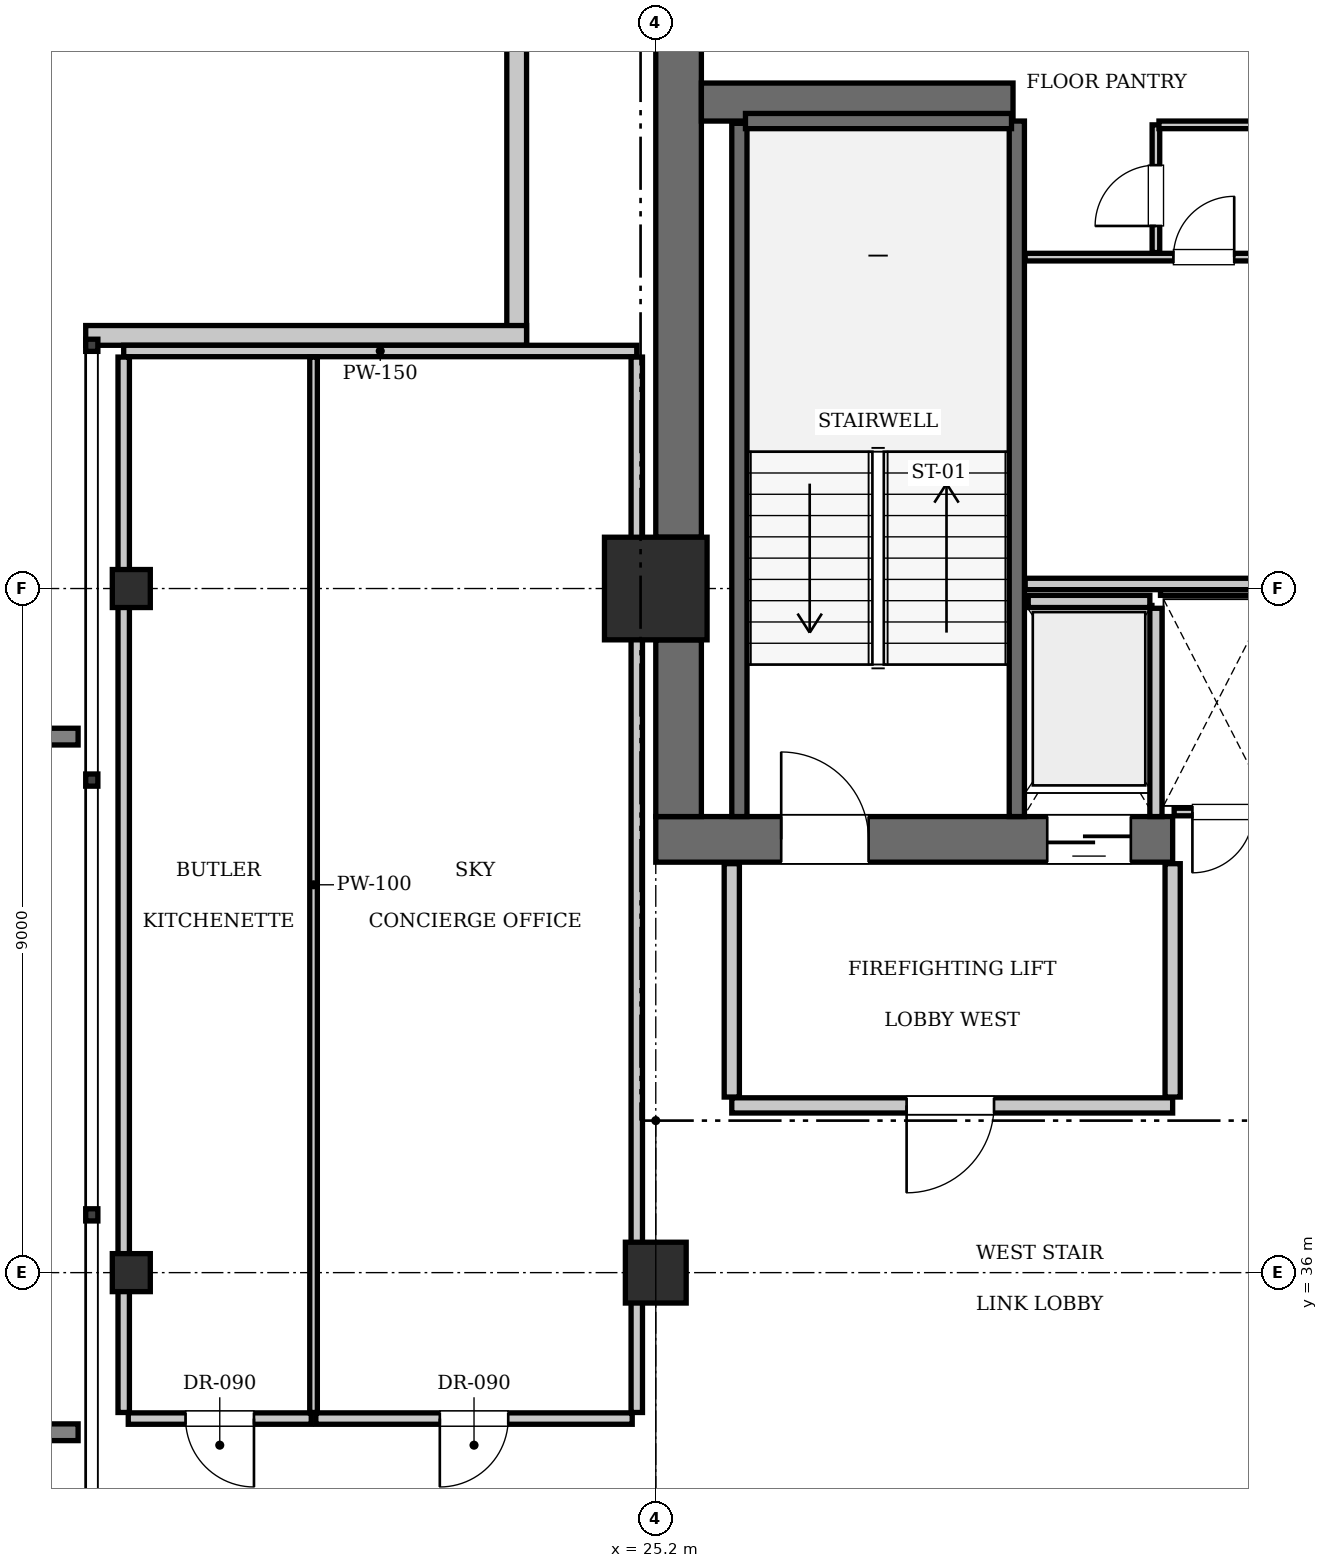
"""IFC4 building model, lengths in metres.
Left out: names, types, materials, properties, quantities, classifications, styles, units other than length and angle.
Written with IfcOpenShell. Run it as: python <this file> out.ifc"""

import sys

from ifc_helpers import new_model, si_unit, direction, frame, frame_2d, origin, origin_2d, place, context, subcontext, project, spatial, rectangle, i_section, extrude, element, fill, save


model = new_model("IFC4")
c1 = context("Model", 3, precision=1e-05, world=origin(), true_north=direction((0.0, 1.0)))
c2 = subcontext(c1, "Body", "Model", "MODEL_VIEW")
j1 = project(units=[si_unit("LENGTHUNIT", "METRE"), si_unit("PLANEANGLEUNIT", "RADIAN")], contexts=[c1])
p1 = place(None, origin())
s1 = spatial("IfcSite", under=j1, at=p1, CompositionType="ELEMENT")
p2 = place(p1, origin())
s2 = spatial("IfcBuilding", under=s1, at=p2, CompositionType="ELEMENT")
p3 = place(p2, frame((0.0, 0.0, 329.7)))
s3 = spatial("IfcBuildingStorey", under=s2, at=p3, CompositionType="ELEMENT", Elevation=329.7)
p4 = place(p3, frame((25.2, 45.0, 0.0), z_axis=(0.0, 0.0, 1.0), x_axis=(1.0, 0.0, 0.0)))
e1 = element("IfcColumn", 1, at=p4, inside=s3, PredefinedType="COLUMN", context=c2, shape_type="SweptSolid", body=[
    extrude(rectangle(XDim=1.35, YDim=1.35, at=origin_2d()), origin(), (0.0, 0.0, 1.0), 3.85),
])
p5 = place(p3, frame((25.2, 41.7, 0.0), z_axis=(0.0, 0.0, 1.0), x_axis=(1.0, 0.0, 0.0)))
e2 = element("IfcWall", 2, at=p5, inside=s3, PredefinedType="SHEAR", context=c2, shape_type="SweptSolid", body=[
    extrude(rectangle(XDim=6.8, YDim=0.6, at=frame_2d((3.4, 0.0))), origin(), (0.0, 0.0, 1.0), 3.85),
])
p6 = place(p5, frame((1.65, 0.0, 0.0)))
e3 = element("IfcOpeningElement", 3, at=p6, cuts=e2, PredefinedType="OPENING", context=c2, shape_type="SweptSolid", body=[
    extrude(rectangle(XDim=1.15, YDim=2.15, at=frame_2d((0.575, 1.075))), frame((0.0, 0.31, 0.0), z_axis=(0.0, -1.0, 0.0), x_axis=(1.0, 0.0, 0.0)), (0.0, 0.0, 1.0), 0.62),
])
p7 = place(p5, frame((5.15, 0.0, 0.0)))
e4 = element("IfcOpeningElement", 4, at=p7, cuts=e2, PredefinedType="OPENING", context=c2, shape_type="SweptSolid", body=[
    extrude(rectangle(XDim=1.1, YDim=2.2, at=frame_2d((0.55, 1.1))), frame((0.0, 0.31, 0.0), z_axis=(0.0, -1.0, 0.0), x_axis=(1.0, 0.0, 0.0)), (0.0, 0.0, 1.0), 0.62),
])
p8 = place(p3, frame((25.5, 42.0, 0.0), z_axis=(0.0, 0.0, 1.0), x_axis=(0.0, 1.0, 0.0)))
e5 = element("IfcWall", 5, at=p8, inside=s3, PredefinedType="SHEAR", context=c2, shape_type="SweptSolid", body=[
    extrude(rectangle(XDim=2.325, YDim=0.6, at=frame_2d((1.163, 0.0))), origin(), (0.0, 0.0, 1.0), 3.85),
])
p9 = place(p3, frame((25.5, 45.675, 0.0), z_axis=(0.0, 0.0, 1.0), x_axis=(0.0, 1.0, 0.0)))
e6 = element("IfcWall", 6, at=p9, inside=s3, PredefinedType="SHEAR", context=c2, shape_type="SweptSolid", body=[
    extrude(rectangle(XDim=7.725, YDim=0.6, at=frame_2d((3.862, 0.0))), origin(), (0.0, 0.0, 1.0), 3.85),
])
p10 = place(p3, frame((25.8, 51.4, 0.0), z_axis=(0.0, 0.0, 1.0), x_axis=(1.0, 0.0, 0.0)))
e7 = element("IfcWall", 7, at=p10, inside=s3, PredefinedType="SHEAR", context=c2, shape_type="SweptSolid", body=[
    extrude(rectangle(XDim=4.1, YDim=0.5, at=frame_2d((2.05, 0.0))), origin(), (0.0, 0.0, 1.0), 3.85),
])
p11 = place(p3, frame((25.2, 36.0, 0.0), z_axis=(0.0, 0.0, 1.0), x_axis=(1.0, 0.0, 0.0)))
e8 = element("IfcColumn", 8, at=p11, inside=s3, PredefinedType="COLUMN", context=c2, shape_type="SweptSolid", body=[
    extrude(rectangle(XDim=0.8, YDim=0.8, at=origin_2d()), origin(), (0.0, 0.0, 1.0), 3.85),
])
for number, where, z_axis, x_axis in (
    (9, (18.3, 36.0, 0.0), (0.0, 0.0, 1.0), (1.0, 0.0, 0.0)),
    (10, (18.3, 45.0, 0.0), (0.0, 0.0, 1.0), (1.0, 0.0, 0.0)),
):
    element("IfcColumn", number, at=place(p3, frame(where, z_axis=z_axis, x_axis=x_axis)), inside=s3, PredefinedType="COLUMN", context=c2, shape_type="SweptSolid", body=[
        extrude(i_section(OverallWidth=0.5, OverallDepth=0.5, WebThickness=0.022, FlangeThickness=0.032, at=origin_2d()), origin(), (0.0, 0.0, 1.0), 3.85),
    ])
p12 = place(p3, frame((29.95, 42.0, 0.0), z_axis=(0.0, 0.0, 1.0), x_axis=(0.0, 1.0, 0.0)))
e11 = element("IfcWall", 11, at=p12, inside=s3, PredefinedType="SOLIDWALL", context=c2, shape_type="SweptSolid", body=[
    extrude(rectangle(XDim=9.15, YDim=0.2, at=frame_2d((4.575, 0.0))), origin(), (0.0, 0.0, 1.0), 3.61),
])
p13 = place(p3, frame((26.3, 42.0, 0.0), z_axis=(0.0, 0.0, 1.0), x_axis=(0.0, 1.0, 0.0)))
e12 = element("IfcWall", 12, at=p13, inside=s3, PredefinedType="SOLIDWALL", context=c2, shape_type="SweptSolid", body=[
    extrude(rectangle(XDim=9.12, YDim=0.2, at=frame_2d((4.56, 0.0))), origin(), (0.0, 0.0, 1.0), 3.61),
])
p14 = place(p3, frame((26.38, 51.15, 0.0), z_axis=(0.0, 0.0, 1.0), x_axis=(1.0, 0.0, 0.0)))
e13 = element("IfcWall", 13, at=p14, inside=s3, PredefinedType="SOLIDWALL", context=c2, shape_type="SweptSolid", body=[
    extrude(rectangle(XDim=3.5, YDim=0.2, at=frame_2d((1.75, 0.0))), origin(), (0.0, 0.0, 1.0), 3.61),
])
p15 = place(p3, frame((30.1, 44.83, 0.0), z_axis=(0.0, 0.0, 1.0), x_axis=(1.0, 0.0, 0.0)))
e14 = element("IfcWall", 14, at=p15, inside=s3, PredefinedType="SOLIDWALL", context=c2, shape_type="SweptSolid", body=[
    extrude(rectangle(XDim=1.6, YDim=0.16, at=frame_2d((0.8, 0.0))), origin(), (0.0, 0.0, 1.0), 3.61),
])
p16 = place(p3, frame((31.78, 42.0, 0.0), z_axis=(0.0, 0.0, 1.0), x_axis=(0.0, 1.0, 0.0)))
e15 = element("IfcWall", 15, at=p16, inside=s3, PredefinedType="SOLIDWALL", context=c2, shape_type="SweptSolid", body=[
    extrude(rectangle(XDim=2.74, YDim=0.16, at=frame_2d((1.37, 0.0))), origin(), (0.0, 0.0, 1.0), 3.61),
])
for number, where, z_axis, x_axis in (
    (16, (23.37, 48.2, 0.0), (0.0, 0.0, 1.0), (0.0, 1.0, 0.0)),
    (17, (17.7, 48.33, 0.0), (0.0, 0.0, 1.0), (1.0, 0.0, 0.0)),
):
    element("IfcWall", number, at=place(p3, frame(where, z_axis=z_axis, x_axis=x_axis)), inside=s3, PredefinedType="SOLIDWALL", context=c2, shape_type="SweptSolid", body=[
        extrude(rectangle(XDim=5.8, YDim=0.26, at=frame_2d((2.9, 0.0))), origin(), (0.0, 0.0, 1.0), 3.61),
    ])
p17 = place(p3, frame((26.2, 38.2, 0.0), z_axis=(0.0, 0.0, 1.0), x_axis=(1.0, 0.0, 0.0)))
e18 = element("IfcWall", 18, at=p17, inside=s3, PredefinedType="PARTITIONING", context=c2, shape_type="SweptSolid", body=[
    extrude(rectangle(XDim=5.8, YDim=0.2, at=frame_2d((2.9, 0.0))), origin(), (0.0, 0.0, 1.0), 3.61),
])
p18 = place(p17, frame((2.3, 0.0, 0.0)))
e19 = element("IfcOpeningElement", 19, at=p18, cuts=e18, PredefinedType="OPENING", context=c2, shape_type="SweptSolid", body=[
    extrude(rectangle(XDim=1.15, YDim=2.15, at=frame_2d((0.575, 1.075))), frame((0.0, 0.11, 0.0), z_axis=(0.0, -1.0, 0.0), x_axis=(1.0, 0.0, 0.0)), (0.0, 0.0, 1.0), 0.22),
])
for number, where, z_axis, x_axis in (
    (20, (26.2, 38.31, 0.0), (0.0, 0.0, 1.0), (0.0, 1.0, 0.0)),
    (21, (32.0, 38.31, 0.0), (0.0, 0.0, 1.0), (0.0, 1.0, 0.0)),
):
    element("IfcWall", number, at=place(p3, frame(where, z_axis=z_axis, x_axis=x_axis)), inside=s3, PredefinedType="PARTITIONING", context=c2, shape_type="SweptSolid", body=[
        extrude(rectangle(XDim=3.07, YDim=0.2, at=frame_2d((1.535, 0.0))), origin(), (0.0, 0.0, 1.0), 3.61),
    ])
p19 = place(p3, frame((32.02, 42.06, 0.0), z_axis=(0.0, 0.0, 1.0), x_axis=(1.0, 0.0, 0.0)))
e22 = element("IfcWall", 22, at=p19, inside=s3, PredefinedType="PARTITIONING", context=c2, shape_type="SweptSolid", body=[
    extrude(rectangle(XDim=1.32, YDim=0.1, at=frame_2d((0.66, 0.0))), origin(), (0.0, 0.0, 1.0), 3.61),
])
p20 = place(p19, frame((0.24, 0.0, 0.0)))
e23 = element("IfcOpeningElement", 23, at=p20, cuts=e22, PredefinedType="OPENING", context=c2, shape_type="SweptSolid", body=[
    extrude(rectangle(XDim=0.8, YDim=2.05, at=frame_2d((0.4, 1.025))), frame((0.0, 0.06, 0.0), z_axis=(0.0, -1.0, 0.0), x_axis=(1.0, 0.0, 0.0)), (0.0, 0.0, 1.0), 0.12),
])
p21 = place(p3, frame((31.84, 44.96, 0.0), z_axis=(0.0, 0.0, 1.0), x_axis=(1.0, 0.0, 0.0)))
e24 = element("IfcWall", 24, at=p21, inside=s3, PredefinedType="PARTITIONING", context=c2, shape_type="SweptSolid", body=[
    extrude(rectangle(XDim=1.48, YDim=0.1, at=frame_2d((0.74, 0.0))), origin(), (0.0, 0.0, 1.0), 3.61),
])
p22 = place(p3, frame((30.06, 45.06, 0.0), z_axis=(0.0, 0.0, 1.0), x_axis=(1.0, 0.0, 0.0)))
e25 = element("IfcWall", 25, at=p22, inside=s3, PredefinedType="PARTITIONING", context=c2, shape_type="SweptSolid", body=[
    extrude(rectangle(XDim=3.18, YDim=0.15, at=frame_2d((1.59, 0.0))), origin(), (0.0, 0.0, 1.0), 3.61),
])
p23 = place(p3, frame((30.06, 49.36, 0.0), z_axis=(0.0, 0.0, 1.0), x_axis=(1.0, 0.0, 0.0)))
e26 = element("IfcWall", 26, at=p23, inside=s3, PredefinedType="PARTITIONING", context=c2, shape_type="SweptSolid", body=[
    extrude(rectangle(XDim=3.18, YDim=0.1, at=frame_2d((1.59, 0.0))), origin(), (0.0, 0.0, 1.0), 3.61),
])
p24 = place(p23, frame((1.95, 0.0, 0.0)))
e27 = element("IfcOpeningElement", 27, at=p24, cuts=e26, PredefinedType="OPENING", context=c2, shape_type="SweptSolid", body=[
    extrude(rectangle(XDim=0.8, YDim=2.05, at=frame_2d((0.4, 1.025))), frame((0.0, 0.06, 0.0), z_axis=(0.0, -1.0, 0.0), x_axis=(1.0, 0.0, 0.0)), (0.0, 0.0, 1.0), 0.12),
])
p25 = place(p3, frame((31.78, 49.42, 0.0), z_axis=(0.0, 0.0, 1.0), x_axis=(0.0, 1.0, 0.0)))
e28 = element("IfcWall", 28, at=p25, inside=s3, PredefinedType="PARTITIONING", context=c2, shape_type="SweptSolid", body=[
    extrude(rectangle(XDim=1.68, YDim=0.1, at=frame_2d((0.84, 0.0))), origin(), (0.0, 0.0, 1.0), 3.61),
])
p26 = place(p25, frame((0.35, 0.0, 0.0)))
e29 = element("IfcOpeningElement", 29, at=p26, cuts=e28, PredefinedType="OPENING", context=c2, shape_type="SweptSolid", body=[
    extrude(rectangle(XDim=0.8, YDim=2.05, at=frame_2d((0.4, 1.025))), frame((0.0, 0.06, 0.0), z_axis=(0.0, -1.0, 0.0), x_axis=(1.0, 0.0, 0.0)), (0.0, 0.0, 1.0), 0.12),
])
p27 = place(p3, frame((31.82, 51.1, 0.0), z_axis=(0.0, 0.0, 1.0), x_axis=(1.0, 0.0, 0.0)))
e30 = element("IfcWall", 30, at=p27, inside=s3, PredefinedType="PARTITIONING", context=c2, shape_type="SweptSolid", body=[
    extrude(rectangle(XDim=1.42, YDim=0.1, at=frame_2d((0.71, 0.0))), origin(), (0.0, 0.0, 1.0), 3.61),
])
p28 = place(p3, frame((18.2, 48.125, 0.0), z_axis=(0.0, 0.0, 1.0), x_axis=(1.0, 0.0, 0.0)))
e31 = element("IfcWall", 31, at=p28, inside=s3, PredefinedType="PARTITIONING", context=c2, shape_type="SweptSolid", body=[
    extrude(rectangle(XDim=6.75, YDim=0.15, at=frame_2d((3.375, 0.0))), origin(), (0.0, 0.0, 1.0), 3.61),
])
p29 = place(p3, frame((18.2, 34.16, 0.0), z_axis=(0.0, 0.0, 1.0), x_axis=(0.0, 1.0, 0.0)))
e32 = element("IfcWall", 32, at=p29, inside=s3, PredefinedType="PARTITIONING", context=c2, shape_type="SweptSolid", body=[
    extrude(rectangle(XDim=13.885, YDim=0.15, at=frame_2d((6.942, 0.0))), origin(), (0.0, 0.0, 1.0), 3.141),
])
p30 = place(p3, frame((24.95, 34.16, 0.0), z_axis=(0.0, 0.0, 1.0), x_axis=(0.0, 1.0, 0.0)))
e33 = element("IfcWall", 33, at=p30, inside=s3, PredefinedType="PARTITIONING", context=c2, shape_type="SweptSolid", body=[
    extrude(rectangle(XDim=13.885, YDim=0.15, at=frame_2d((6.942, 0.0))), origin(), (0.0, 0.0, 1.0), 3.61),
])
p31 = place(p3, frame((18.26, 34.08, 0.0), z_axis=(0.0, 0.0, 1.0), x_axis=(1.0, 0.0, 0.0)))
e34 = element("IfcWall", 34, at=p31, inside=s3, PredefinedType="PARTITIONING", context=c2, shape_type="SweptSolid", body=[
    extrude(rectangle(XDim=2.407, YDim=0.15, at=frame_2d((1.204, 0.0))), origin(), (0.0, 0.0, 1.0), 3.61),
])
p32 = place(p31, frame((0.754, 0.0, 0.0)))
e35 = element("IfcOpeningElement", 35, at=p32, cuts=e34, PredefinedType="OPENING", context=c2, shape_type="SweptSolid", body=[
    extrude(rectangle(XDim=0.9, YDim=2.1, at=frame_2d((0.45, 1.05))), frame((0.0, 0.085, 0.0), z_axis=(0.0, -1.0, 0.0), x_axis=(1.0, 0.0, 0.0)), (0.0, 0.0, 1.0), 0.17),
])
p33 = place(p3, frame((20.698, 34.16, 0.0), z_axis=(0.0, 0.0, 1.0), x_axis=(0.0, 1.0, 0.0)))
e36 = element("IfcWall", 36, at=p33, inside=s3, PredefinedType="PARTITIONING", context=c2, shape_type="SweptSolid", body=[
    extrude(rectangle(XDim=13.885, YDim=0.1, at=frame_2d((6.942, 0.0))), origin(), (0.0, 0.0, 1.0), 3.61),
])
p34 = place(p3, frame((20.728, 34.08, 0.0), z_axis=(0.0, 0.0, 1.0), x_axis=(1.0, 0.0, 0.0)))
e37 = element("IfcWall", 37, at=p34, inside=s3, PredefinedType="PARTITIONING", context=c2, shape_type="SweptSolid", body=[
    extrude(rectangle(XDim=4.162, YDim=0.15, at=frame_2d((2.081, 0.0))), origin(), (0.0, 0.0, 1.0), 3.61),
])
p35 = place(p34, frame((1.631, 0.0, 0.0)))
e38 = element("IfcOpeningElement", 38, at=p35, cuts=e37, PredefinedType="OPENING", context=c2, shape_type="SweptSolid", body=[
    extrude(rectangle(XDim=0.9, YDim=2.1, at=frame_2d((0.45, 1.05))), frame((0.0, 0.085, 0.0), z_axis=(0.0, -1.0, 0.0), x_axis=(1.0, 0.0, 0.0)), (0.0, 0.0, 1.0), 0.17),
])
p36 = place(p6, origin())
e39 = element("IfcDoor", 39, at=p36, inside=s3, OperationType="SINGLE_SWING_LEFT", PredefinedType="DOOR", context=c2, shape_type="SweptSolid", body=[
    extrude(rectangle(XDim=1.15, YDim=2.15, at=frame_2d((0.575, 1.075))), frame((0.0, 0.025, 0.0), z_axis=(0.0, -1.0, 0.0), x_axis=(1.0, 0.0, 0.0)), (0.0, 0.0, 1.0), 0.05),
])
fill(e3, e39)
p37 = place(p7, frame((1.1, 0.0, 0.0), z_axis=(0.0, 0.0, 1.0), x_axis=(-1.0, 0.0, 0.0)))
e40 = element("IfcDoor", 40, at=p37, inside=s3, OperationType="SLIDING_TO_LEFT", PredefinedType="DOOR", context=c2, shape_type="SweptSolid", body=[
    extrude(rectangle(XDim=1.1, YDim=2.2, at=frame_2d((0.55, 1.1))), frame((0.0, 0.025, 0.0), z_axis=(0.0, -1.0, 0.0), x_axis=(1.0, 0.0, 0.0)), (0.0, 0.0, 1.0), 0.05),
])
fill(e4, e40)
p38 = place(p18, frame((1.15, 0.0, 0.0), z_axis=(0.0, 0.0, 1.0), x_axis=(-1.0, 0.0, 0.0)))
e41 = element("IfcDoor", 41, at=p38, inside=s3, OperationType="SINGLE_SWING_RIGHT", PredefinedType="DOOR", context=c2, shape_type="SweptSolid", body=[
    extrude(rectangle(XDim=1.15, YDim=2.15, at=frame_2d((0.575, 1.075))), frame((0.0, 0.025, 0.0), z_axis=(0.0, -1.0, 0.0), x_axis=(1.0, 0.0, 0.0)), (0.0, 0.0, 1.0), 0.05),
])
fill(e19, e41)
p39 = place(p20, frame((0.8, 0.0, 0.0), z_axis=(0.0, 0.0, 1.0), x_axis=(-1.0, 0.0, 0.0)))
e42 = element("IfcDoor", 42, at=p39, inside=s3, OperationType="SINGLE_SWING_RIGHT", PredefinedType="DOOR", context=c2, shape_type="SweptSolid", body=[
    extrude(rectangle(XDim=0.8, YDim=2.05, at=frame_2d((0.4, 1.025))), frame((0.0, 0.025, 0.0), z_axis=(0.0, -1.0, 0.0), x_axis=(1.0, 0.0, 0.0)), (0.0, 0.0, 1.0), 0.05),
])
fill(e23, e42)
p40 = place(p24, origin())
e43 = element("IfcDoor", 43, at=p40, inside=s3, OperationType="SINGLE_SWING_RIGHT", PredefinedType="DOOR", context=c2, shape_type="SweptSolid", body=[
    extrude(rectangle(XDim=0.8, YDim=2.05, at=frame_2d((0.4, 1.025))), frame((0.0, 0.025, 0.0), z_axis=(0.0, -1.0, 0.0), x_axis=(1.0, 0.0, 0.0)), (0.0, 0.0, 1.0), 0.05),
])
fill(e27, e43)
p41 = place(p26, origin())
e44 = element("IfcDoor", 44, at=p41, inside=s3, OperationType="SINGLE_SWING_LEFT", PredefinedType="DOOR", context=c2, shape_type="SweptSolid", body=[
    extrude(rectangle(XDim=0.8, YDim=2.05, at=frame_2d((0.4, 1.025))), frame((0.0, 0.025, 0.0), z_axis=(0.0, -1.0, 0.0), x_axis=(1.0, 0.0, 0.0)), (0.0, 0.0, 1.0), 0.05),
])
fill(e29, e44)
p42 = place(p32, frame((0.9, 0.0, 0.0), z_axis=(0.0, 0.0, 1.0), x_axis=(-1.0, 0.0, 0.0)))
e45 = element("IfcDoor", 45, at=p42, inside=s3, OperationType="SINGLE_SWING_LEFT", PredefinedType="DOOR", context=c2, shape_type="SweptSolid", body=[
    extrude(rectangle(XDim=0.9, YDim=2.1, at=frame_2d((0.45, 1.05))), frame((0.0, 0.025, 0.0), z_axis=(0.0, -1.0, 0.0), x_axis=(1.0, 0.0, 0.0)), (0.0, 0.0, 1.0), 0.05),
])
fill(e35, e45)
p43 = place(p35, frame((0.9, 0.0, 0.0), z_axis=(0.0, 0.0, 1.0), x_axis=(-1.0, 0.0, 0.0)))
e46 = element("IfcDoor", 46, at=p43, inside=s3, OperationType="SINGLE_SWING_RIGHT", PredefinedType="DOOR", context=c2, shape_type="SweptSolid", body=[
    extrude(rectangle(XDim=0.9, YDim=2.1, at=frame_2d((0.45, 1.05))), frame((0.0, 0.025, 0.0), z_axis=(0.0, -1.0, 0.0), x_axis=(1.0, 0.0, 0.0)), (0.0, 0.0, 1.0), 0.05),
])
fill(e38, e46)
save(model, sys.argv[1])
